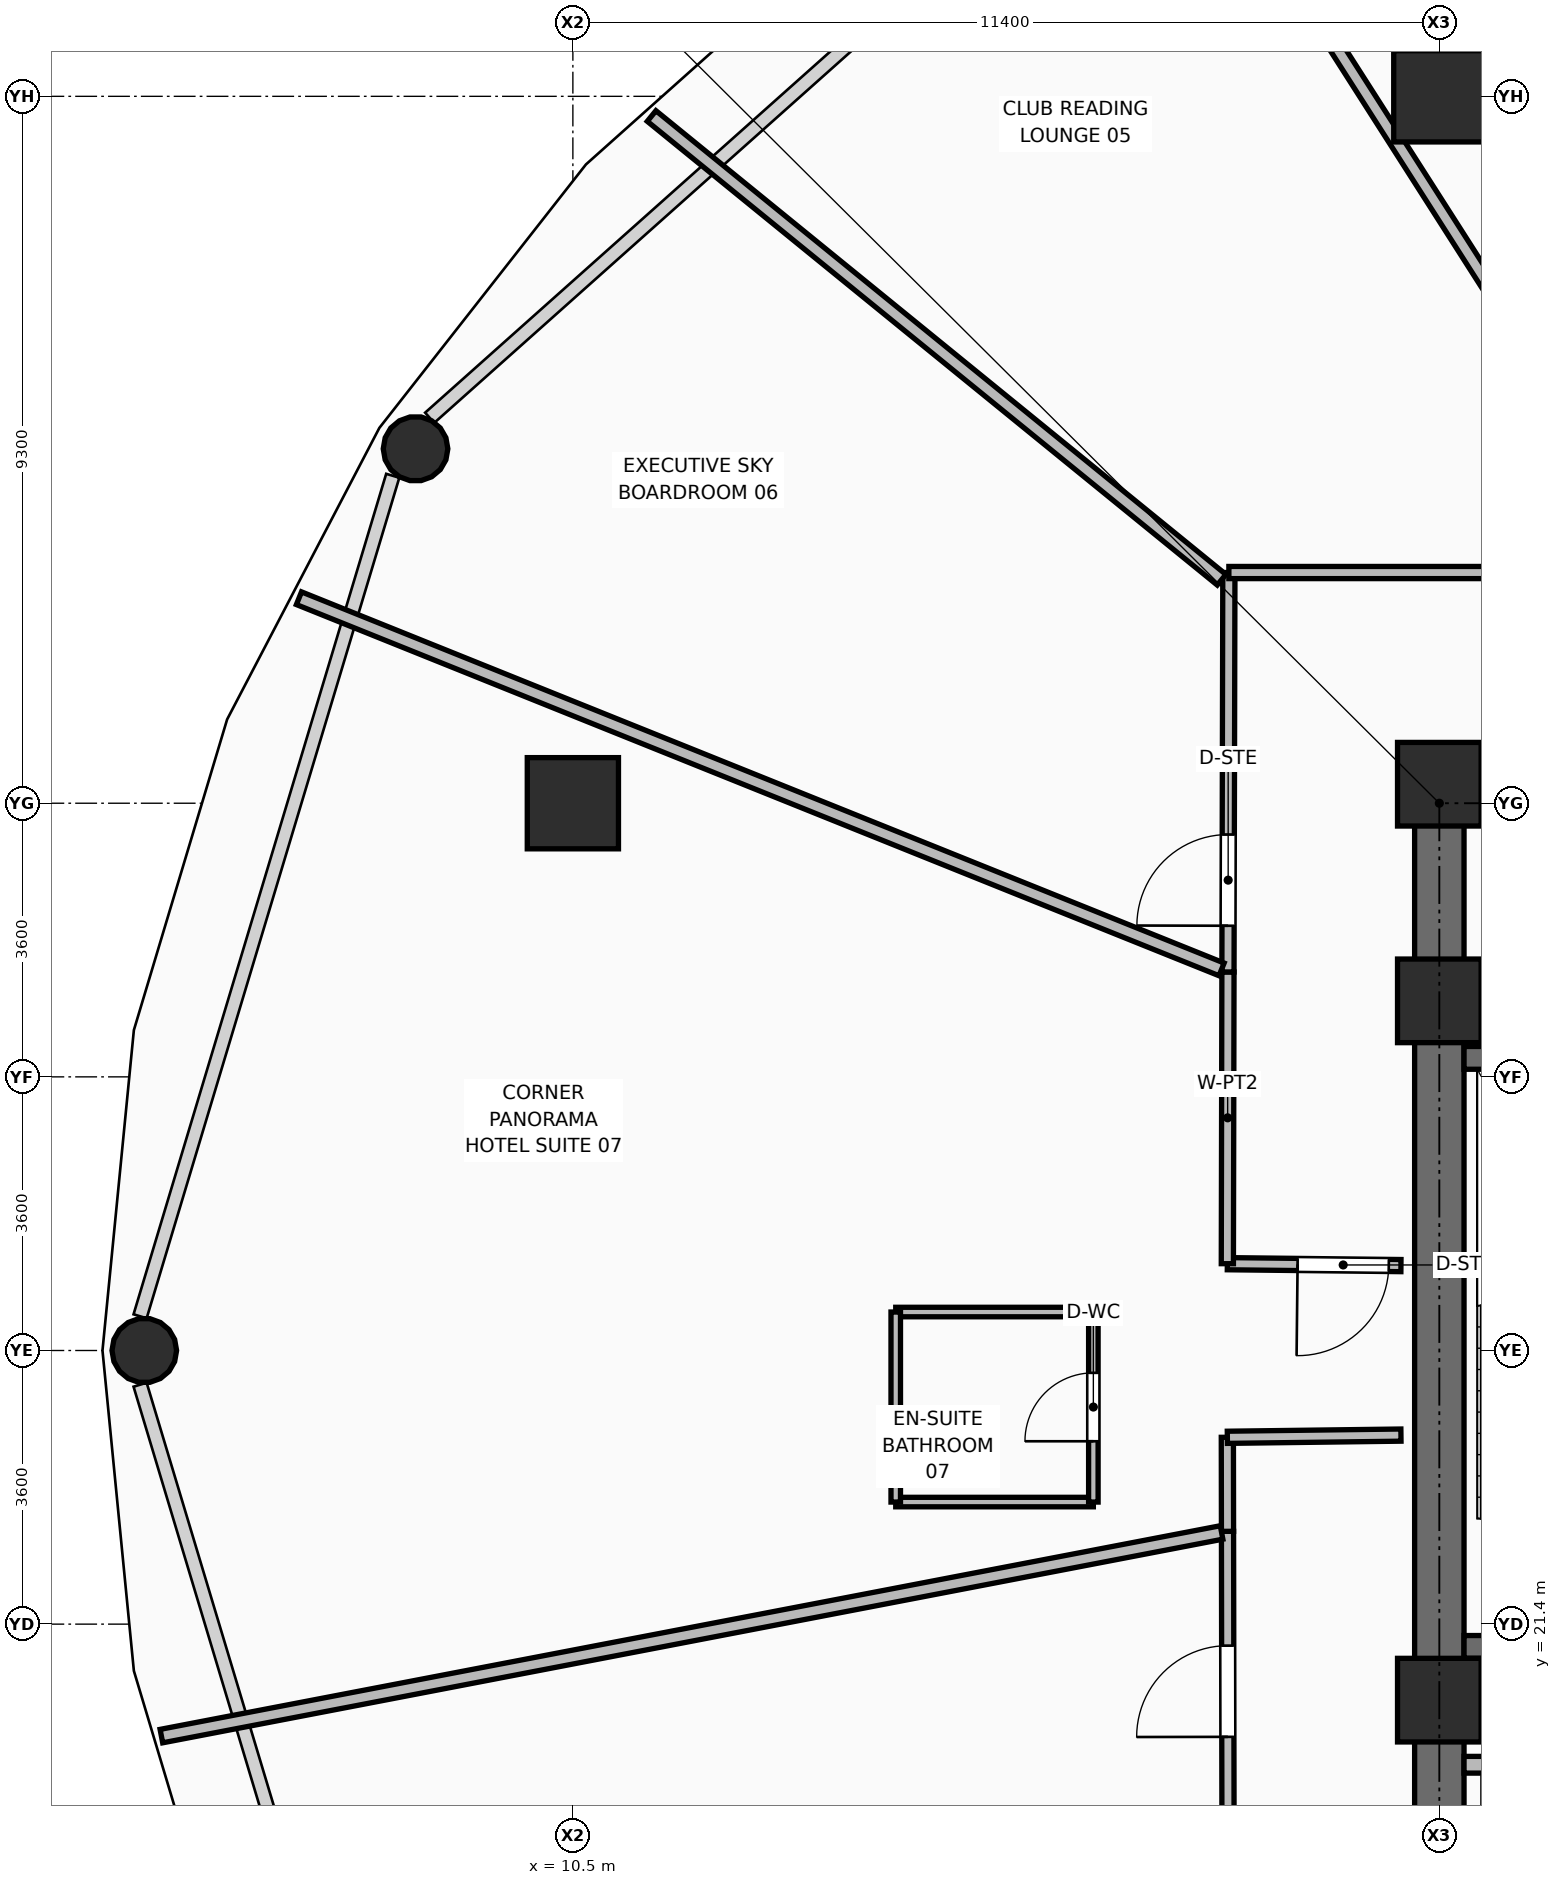
"""IFC4 building model, lengths in metres.
Left out: names, types, materials, properties, quantities, classifications, styles, units other than length and angle.
Written with IfcOpenShell. Run it as: python <this file> out.ifc"""

import sys

from ifc_helpers import new_model, si_unit, direction, frame, frame_2d, origin, origin_2d, place, context, subcontext, project, spatial, rectangle, hollow_rectangle, hollow_circle, extrude, element, fill, save


model = new_model("IFC4")
c1 = context("Model", 3, precision=1e-05, world=origin(), true_north=direction((0.0, 1.0)))
c2 = subcontext(c1, "Body", "Model", "MODEL_VIEW")
j1 = project(units=[si_unit("LENGTHUNIT", "METRE"), si_unit("PLANEANGLEUNIT", "RADIAN")], contexts=[c1])
p1 = place(None, origin())
s1 = spatial("IfcSite", under=j1, at=p1, CompositionType="ELEMENT")
p2 = place(p1, origin())
s2 = spatial("IfcBuilding", under=s1, at=p2, CompositionType="ELEMENT")
p3 = place(p2, frame((0.0, 0.0, 49.5)))
s3 = spatial("IfcBuildingStorey", under=s2, at=p3, CompositionType="ELEMENT", Elevation=49.5)
for number, where, z_axis, x_axis in (
    (1, (21.9, 20.4, 0.0), (0.0, 0.0, 1.0), (1.0, 0.0, 0.0)),
    (2, (21.9, 29.6, 0.0), (0.0, 0.0, 1.0), (1.0, 0.0, 0.0)),
    (3, (21.9, 32.45, 0.0), (0.0, 0.0, 1.0), (1.0, 0.0, 0.0)),
):
    element("IfcColumn", number, at=place(p3, frame(where, z_axis=z_axis, x_axis=x_axis)), inside=s3, PredefinedType="COLUMN", context=c2, shape_type="SweptSolid", body=[
        extrude(rectangle(XDim=1.1, YDim=1.1, at=origin_2d()), origin(), (0.0, 0.0, 1.0), 3.75),
    ])
for number, where, z_axis, x_axis in (
    (4, (10.5, 32.2, 0.0), (0.0, 0.0, 1.0), (1.0, 0.0, 0.0)),
    (5, (21.9, 41.5, 0.0), (0.0, 0.0, 1.0), (1.0, 0.0, 0.0)),
):
    element("IfcColumn", number, at=place(p3, frame(where, z_axis=z_axis, x_axis=x_axis)), inside=s3, PredefinedType="COLUMN", context=c2, shape_type="SweptSolid", body=[
        extrude(hollow_rectangle(XDim=1.2, YDim=1.2, WallThickness=0.045, at=origin_2d()), origin(), (0.0, 0.0, 1.0), 3.75),
    ])
for number, where, z_axis, x_axis in (
    (6, (8.43, 36.863, 0.0), (0.0, 0.0, 1.0), (1.0, 0.0, 0.0)),
    (7, (4.861, 25.0, 0.0), (0.0, 0.0, 1.0), (1.0, 0.0, 0.0)),
):
    element("IfcColumn", number, at=place(p3, frame(where, z_axis=z_axis, x_axis=x_axis)), inside=s3, PredefinedType="COLUMN", context=c2, shape_type="SweptSolid", body=[
        extrude(hollow_circle(Radius=0.425, WallThickness=0.04, at=origin_2d()), origin(), (0.0, 0.0, 1.0), 3.57),
    ])
p4 = place(p3, frame((21.575, 32.45, 0.0), z_axis=(0.0, 0.0, 1.0), x_axis=(1.0, 0.0, 0.0)))
e8 = element("IfcWall", 8, at=p4, inside=s3, PredefinedType="SHEAR", context=c2, shape_type="SweptSolid", body=[
    extrude(rectangle(XDim=19.85, YDim=0.65, at=frame_2d((9.925, 0.0))), origin(), (0.0, 0.0, 1.0), 3.57),
])
p5 = place(p4, frame((2.175, 0.0, 0.0)))
e9 = element("IfcOpeningElement", 9, at=p5, cuts=e8, PredefinedType="OPENING", context=c2, shape_type="SweptSolid", body=[
    extrude(rectangle(XDim=1.1, YDim=2.1, at=frame_2d((0.55, 1.05))), frame((0.0, 0.335, 0.0), z_axis=(0.0, -1.0, 0.0), x_axis=(1.0, 0.0, 0.0)), (0.0, 0.0, 1.0), 0.67),
])
p6 = place(p4, frame((15.565, 0.0, 0.0)))
e10 = element("IfcOpeningElement", 10, at=p6, cuts=e8, PredefinedType="OPENING", context=c2, shape_type="SweptSolid", body=[
    extrude(rectangle(XDim=1.0, YDim=2.1, at=frame_2d((0.5, 1.05))), frame((0.0, 0.335, 0.0), z_axis=(0.0, -1.0, 0.0), x_axis=(1.0, 0.0, 0.0)), (0.0, 0.0, 1.0), 0.67),
])
p7 = place(p4, frame((17.575, 0.0, 0.0)))
e11 = element("IfcOpeningElement", 11, at=p7, cuts=e8, PredefinedType="OPENING", context=c2, shape_type="SweptSolid", body=[
    extrude(rectangle(XDim=0.9, YDim=2.1, at=frame_2d((0.45, 1.05))), frame((0.0, 0.335, 0.0), z_axis=(0.0, -1.0, 0.0), x_axis=(1.0, 0.0, 0.0)), (0.0, 0.0, 1.0), 0.67),
])
p8 = place(p3, frame((21.9, 18.125, 0.0), z_axis=(0.0, 0.0, 1.0), x_axis=(0.0, 1.0, 0.0)))
e12 = element("IfcWall", 12, at=p8, inside=s3, PredefinedType="SHEAR", context=c2, shape_type="SweptSolid", body=[
    extrude(rectangle(XDim=14.0, YDim=0.65, at=frame_2d((7.0, 0.0))), origin(), (0.0, 0.0, 1.0), 3.57),
])
p9 = place(p3, frame((22.225, 21.1, 0.0), z_axis=(0.0, 0.0, 1.0), x_axis=(1.0, 0.0, 0.0)))
e13 = element("IfcWall", 13, at=p9, inside=s3, PredefinedType="SHEAR", context=c2, shape_type="SweptSolid", body=[
    extrude(rectangle(XDim=3.515, YDim=0.3, at=frame_2d((1.757, 0.0))), origin(), (0.0, 0.0, 1.0), 3.57),
])
p10 = place(p9, frame((1.995, 0.0, 0.0)))
e14 = element("IfcOpeningElement", 14, at=p10, cuts=e13, PredefinedType="OPENING", context=c2, shape_type="SweptSolid", body=[
    extrude(rectangle(XDim=1.05, YDim=2.1, at=frame_2d((0.525, 1.05))), frame((0.0, 0.16, 0.0), z_axis=(0.0, -1.0, 0.0), x_axis=(1.0, 0.0, 0.0)), (0.0, 0.0, 1.0), 0.32),
])
p11 = place(p3, frame((22.225, 28.85, 0.0), z_axis=(0.0, 0.0, 1.0), x_axis=(1.0, 0.0, 0.0)))
e15 = element("IfcWall", 15, at=p11, inside=s3, PredefinedType="SHEAR", context=c2, shape_type="SweptSolid", body=[
    extrude(rectangle(XDim=3.515, YDim=0.3, at=frame_2d((1.757, 0.0))), origin(), (0.0, 0.0, 1.0), 3.57),
])
p12 = place(p3, frame((22.225, 19.55, 0.0), z_axis=(0.0, 0.0, 1.0), x_axis=(1.0, 0.0, 0.0)))
e16 = element("IfcWall", 16, at=p12, inside=s3, PredefinedType="PARTITIONING", context=c2, shape_type="SweptSolid", body=[
    extrude(rectangle(XDim=1.565, YDim=0.22, at=frame_2d((0.782, 0.0))), origin(), (0.0, 0.0, 1.0), 2.595),
])
p13 = place(p3, frame((21.395, 26.117, 0.0), z_axis=(0.0, 0.0, 1.0), x_axis=(-0.999939393754, 0.011009487713, 0.0)))
e17 = element("IfcWall", 17, at=p13, inside=s3, PredefinedType="PARTITIONING", context=c2, shape_type="SweptSolid", body=[
    extrude(rectangle(XDim=2.284, YDim=0.16, at=frame_2d((1.142, 0.0))), origin(), (0.0, 0.0, 1.0), 3.55),
])
p14 = place(p13, frame((0.16, 0.0, 0.0)))
e18 = element("IfcOpeningElement", 18, at=p14, cuts=e17, PredefinedType="OPENING", context=c2, shape_type="SweptSolid", body=[
    extrude(rectangle(XDim=1.2, YDim=2.1, at=frame_2d((0.6, 1.05))), frame((0.0, 0.09, 0.0), z_axis=(0.0, -1.0, 0.0), x_axis=(1.0, 0.0, 0.0)), (0.0, 0.0, 1.0), 0.18),
])
p15 = place(p3, frame((19.111, 26.142, 0.0), z_axis=(0.0, 0.0, 1.0), x_axis=(0.002035619192, 0.999997928125, 0.0)))
e19 = element("IfcWall", 19, at=p15, inside=s3, PredefinedType="PARTITIONING", context=c2, shape_type="SweptSolid", body=[
    extrude(rectangle(XDim=3.838, YDim=0.16, at=frame_2d((1.919, 0.0))), origin(), (0.0, 0.0, 1.0), 3.55),
])
p16 = place(p3, frame((19.119, 29.98, 0.0), z_axis=(0.0, 0.0, 1.0), x_axis=(0.002322874105, 0.999997302124, 0.0)))
e20 = element("IfcWall", 20, at=p16, inside=s3, PredefinedType="PARTITIONING", context=c2, shape_type="SweptSolid", body=[
    extrude(rectangle(XDim=5.255, YDim=0.16, at=frame_2d((2.627, 0.0))), origin(), (0.0, 0.0, 1.0), 2.928),
])
p17 = place(p16, frame((0.608, 0.0, 0.0)))
e21 = element("IfcOpeningElement", 21, at=p17, cuts=e20, PredefinedType="OPENING", context=c2, shape_type="SweptSolid", body=[
    extrude(rectangle(XDim=1.2, YDim=2.1, at=frame_2d((0.6, 1.05))), frame((0.0, 0.09, 0.0), z_axis=(0.0, -1.0, 0.0), x_axis=(1.0, 0.0, 0.0)), (0.0, 0.0, 1.0), 0.18),
])
p18 = place(p3, frame((19.131, 35.235, 0.0), z_axis=(0.0, 0.0, 1.0), x_axis=(1.0, 0.0, 0.0)))
e22 = element("IfcWall", 22, at=p18, inside=s3, PredefinedType="PARTITIONING", context=c2, shape_type="SweptSolid", body=[
    extrude(rectangle(XDim=5.829, YDim=0.16, at=frame_2d((2.915, 0.0))), origin(), (0.0, 0.0, 1.0), 2.928),
])
p19 = place(p18, frame((4.023, 0.0, 0.0)))
e23 = element("IfcOpeningElement", 23, at=p19, cuts=e22, PredefinedType="OPENING", context=c2, shape_type="SweptSolid", body=[
    extrude(rectangle(XDim=1.2, YDim=2.1, at=frame_2d((0.6, 1.05))), frame((0.0, 0.09, 0.0), z_axis=(0.0, -1.0, 0.0), x_axis=(1.0, 0.0, 0.0)), (0.0, 0.0, 1.0), 0.18),
])
p20 = place(p3, frame((19.13, 12.587, 0.0), z_axis=(0.0, 0.0, 1.0), x_axis=(-0.001678829751, 0.999998590764, 0.0)))
e24 = element("IfcWall", 24, at=p20, inside=s3, PredefinedType="PARTITIONING", context=c2, shape_type="SweptSolid", body=[
    extrude(rectangle(XDim=10.034, YDim=0.16, at=frame_2d((5.017, 0.0))), origin(), (0.0, 0.0, 1.0), 2.928),
])
p21 = place(p20, frame((7.33, 0.0, 0.0)))
e25 = element("IfcOpeningElement", 25, at=p21, cuts=e24, PredefinedType="OPENING", context=c2, shape_type="SweptSolid", body=[
    extrude(rectangle(XDim=1.2, YDim=2.1, at=frame_2d((0.6, 1.05))), frame((0.0, 0.09, 0.0), z_axis=(0.0, -1.0, 0.0), x_axis=(1.0, 0.0, 0.0)), (0.0, 0.0, 1.0), 0.18),
])
p22 = place(p3, frame((19.113, 22.621, 0.0), z_axis=(0.0, 0.0, 1.0), x_axis=(-0.001579153183, 0.999998753137, 0.0)))
e26 = element("IfcWall", 26, at=p22, inside=s3, PredefinedType="PARTITIONING", context=c2, shape_type="SweptSolid", body=[
    extrude(rectangle(XDim=1.237, YDim=0.16, at=frame_2d((0.618, 0.0))), origin(), (0.0, 0.0, 1.0), 3.55),
])
p23 = place(p3, frame((19.111, 23.858, 0.0), z_axis=(0.0, 0.0, 1.0), x_axis=(0.999919104634, 0.01271944131, 0.0)))
e27 = element("IfcWall", 27, at=p23, inside=s3, PredefinedType="PARTITIONING", context=c2, shape_type="SweptSolid", body=[
    extrude(rectangle(XDim=2.284, YDim=0.16, at=frame_2d((1.142, 0.0))), origin(), (0.0, 0.0, 1.0), 3.55),
])
p24 = place(p3, frame((24.909, 35.315, 0.0), z_axis=(0.0, 0.0, 1.0), x_axis=(-0.538458076676, 0.842652300574, 0.0)))
e28 = element("IfcWall", 28, at=p24, inside=s3, PredefinedType="PARTITIONING", context=c2, shape_type="SweptSolid", body=[
    extrude(rectangle(XDim=12.669, YDim=0.18, at=frame_2d((6.335, 0.0))), origin(), (0.0, 0.0, 1.0), 2.775),
])
p25 = place(p3, frame((19.035, 35.14, 0.0), z_axis=(0.0, 0.0, 1.0), x_axis=(-0.77570287791, 0.631098284899, 0.0)))
e29 = element("IfcWall", 29, at=p25, inside=s3, PredefinedType="PARTITIONING", context=c2, shape_type="SweptSolid", body=[
    extrude(rectangle(XDim=9.667, YDim=0.18, at=frame_2d((4.834, 0.0))), origin(), (0.0, 0.0, 1.0), 2.775),
])
p26 = place(p3, frame((19.035, 30.014, 0.0), z_axis=(0.0, 0.0, 1.0), x_axis=(-0.927750435419, 0.373201191827, 0.0)))
e30 = element("IfcWall", 30, at=p26, inside=s3, PredefinedType="PARTITIONING", context=c2, shape_type="SweptSolid", body=[
    extrude(rectangle(XDim=13.084, YDim=0.18, at=frame_2d((6.542, 0.0))), origin(), (0.0, 0.0, 1.0), 2.775),
])
p27 = place(p3, frame((19.035, 22.606, 0.0), z_axis=(0.0, 0.0, 1.0), x_axis=(-0.982052637136, -0.188607046247, 0.0)))
e31 = element("IfcWall", 31, at=p27, inside=s3, PredefinedType="PARTITIONING", context=c2, shape_type="SweptSolid", body=[
    extrude(rectangle(XDim=14.204, YDim=0.18, at=frame_2d((7.102, 0.0))), origin(), (0.0, 0.0, 1.0), 2.775),
])
for number, where, z_axis, x_axis in (
    (32, (14.748, 23.006, 0.0), (0.0, 0.0, 1.0), (1.0, 0.0, 0.0)),
    (33, (14.748, 25.506, 0.0), (0.0, 0.0, 1.0), (1.0, 0.0, 0.0)),
):
    element("IfcWall", number, at=place(p3, frame(where, z_axis=z_axis, x_axis=x_axis)), inside=s3, PredefinedType="PARTITIONING", context=c2, shape_type="SweptSolid", body=[
        extrude(rectangle(XDim=2.6, YDim=0.125, at=frame_2d((1.3, 0.0))), origin(), (0.0, 0.0, 1.0), 3.55),
    ])
p28 = place(p3, frame((14.748, 23.006, 0.0), z_axis=(0.0, 0.0, 1.0), x_axis=(0.0, 1.0, 0.0)))
e34 = element("IfcWall", 34, at=p28, inside=s3, PredefinedType="PARTITIONING", context=c2, shape_type="SweptSolid", body=[
    extrude(rectangle(XDim=2.5, YDim=0.125, at=frame_2d((1.25, 0.0))), origin(), (0.0, 0.0, 1.0), 3.55),
])
p29 = place(p3, frame((17.348, 23.006, 0.0), z_axis=(0.0, 0.0, 1.0), x_axis=(0.0, 1.0, 0.0)))
e35 = element("IfcWall", 35, at=p29, inside=s3, PredefinedType="PARTITIONING", context=c2, shape_type="SweptSolid", body=[
    extrude(rectangle(XDim=2.5, YDim=0.125, at=frame_2d((1.25, 0.0))), origin(), (0.0, 0.0, 1.0), 3.55),
])
p30 = place(p29, frame((0.8, 0.0, 0.0)))
e36 = element("IfcOpeningElement", 36, at=p30, cuts=e35, PredefinedType="OPENING", context=c2, shape_type="SweptSolid", body=[
    extrude(rectangle(XDim=0.9, YDim=2.1, at=frame_2d((0.45, 1.05))), frame((0.0, 0.073, 0.0), z_axis=(0.0, -1.0, 0.0), x_axis=(1.0, 0.0, 0.0)), (0.0, 0.0, 1.0), 0.145),
])
p31 = place(p17, origin())
e37 = element("IfcDoor", 37, at=p31, inside=s3, OperationType="SINGLE_SWING_LEFT", PredefinedType="DOOR", context=c2, shape_type="SweptSolid", body=[
    extrude(rectangle(XDim=1.2, YDim=2.1, at=frame_2d((0.6, 1.05))), frame((0.0, 0.025, 0.0), z_axis=(0.0, -1.0, 0.0), x_axis=(1.0, 0.0, 0.0)), (0.0, 0.0, 1.0), 0.05),
])
fill(e21, e37)
p32 = place(p30, origin())
e38 = element("IfcDoor", 38, at=p32, inside=s3, OperationType="SINGLE_SWING_LEFT", PredefinedType="DOOR", context=c2, shape_type="SweptSolid", body=[
    extrude(rectangle(XDim=0.9, YDim=2.1, at=frame_2d((0.45, 1.05))), frame((0.0, 0.025, 0.0), z_axis=(0.0, -1.0, 0.0), x_axis=(1.0, 0.0, 0.0)), (0.0, 0.0, 1.0), 0.05),
])
fill(e36, e38)
p33 = place(p14, origin())
e39 = element("IfcDoor", 39, at=p33, inside=s3, OperationType="SINGLE_SWING_RIGHT", PredefinedType="DOOR", context=c2, shape_type="SweptSolid", body=[
    extrude(rectangle(XDim=1.2, YDim=2.1, at=frame_2d((0.6, 1.05))), frame((0.0, 0.025, 0.0), z_axis=(0.0, -1.0, 0.0), x_axis=(1.0, 0.0, 0.0)), (0.0, 0.0, 1.0), 0.05),
])
fill(e18, e39)
p34 = place(p21, origin())
e40 = element("IfcDoor", 40, at=p34, inside=s3, OperationType="SINGLE_SWING_LEFT", PredefinedType="DOOR", context=c2, shape_type="SweptSolid", body=[
    extrude(rectangle(XDim=1.2, YDim=2.1, at=frame_2d((0.6, 1.05))), frame((0.0, 0.025, 0.0), z_axis=(0.0, -1.0, 0.0), x_axis=(1.0, 0.0, 0.0)), (0.0, 0.0, 1.0), 0.05),
])
fill(e25, e40)
save(model, sys.argv[1])
